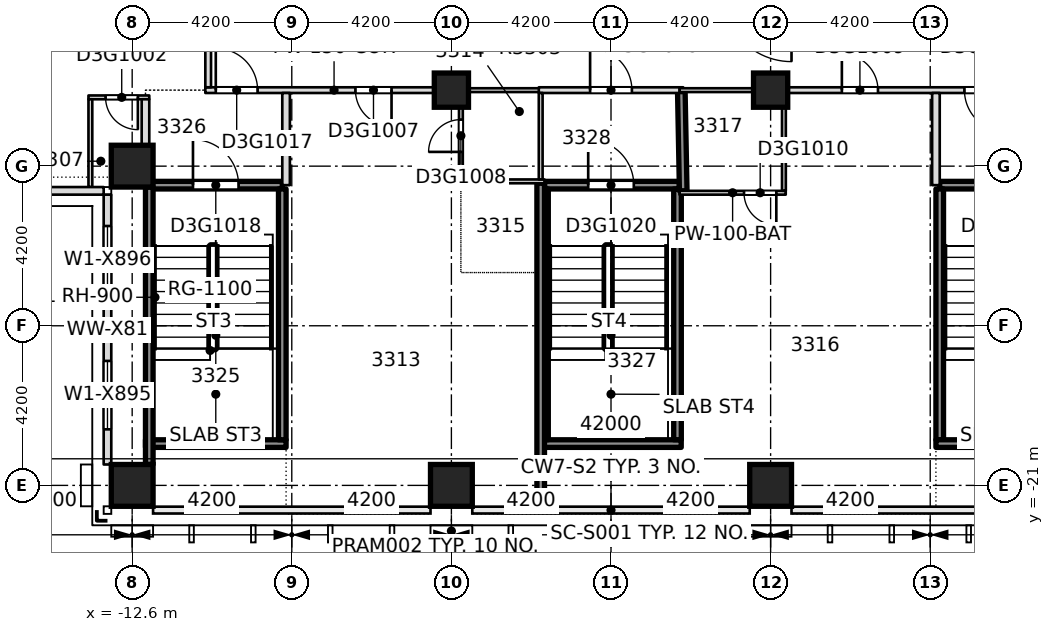
"""IFC4 building model, lengths in metres.
Left out: names, types, materials, properties, quantities, classifications, styles, units other than length and angle.
Written with IfcOpenShell. Run it as: python <this file> out.ifc"""

import sys

from ifc_helpers import new_model, si_unit, direction, frame, frame_2d, origin, origin_2d, place, context, subcontext, project, spatial, rectangle, extrude, element, fill, save


model = new_model("IFC4")
c1 = context("Model", 3, precision=1e-05, world=origin(), true_north=direction((0.0, 1.0)))
c2 = subcontext(c1, "Body", "Model", "MODEL_VIEW")
j1 = project(units=[si_unit("LENGTHUNIT", "METRE"), si_unit("PLANEANGLEUNIT", "RADIAN")], contexts=[c1])
p1 = place(None, origin())
s1 = spatial("IfcSite", under=j1, at=p1, CompositionType="ELEMENT")
p2 = place(p1, origin())
s2 = spatial("IfcBuilding", under=s1, at=p2, CompositionType="ELEMENT")
p3 = place(p2, frame((0.0, 0.0, 133.1)))
s3 = spatial("IfcBuildingStorey", under=s2, at=p3, CompositionType="ELEMENT", Elevation=133.1)
for number, where, z_axis, x_axis in (
    (1, (-12.6, -21.0, -0.4), (0.0, 0.0, 1.0), (1.0, 0.0, 0.0)),
    (2, (-4.2, -21.0, -0.4), (0.0, 0.0, 1.0), (1.0, 0.0, 0.0)),
    (3, (4.2, -21.0, -0.4), (0.0, 0.0, 1.0), (1.0, 0.0, 0.0)),
    (4, (-12.6, -12.6, -0.4), (0.0, 0.0, 1.0), (1.0, 0.0, 0.0)),
):
    element("IfcColumn", number, at=place(p3, frame(where, z_axis=z_axis, x_axis=x_axis)), inside=s3, PredefinedType="COLUMN", context=c2, shape_type="SweptSolid", body=[
        extrude(rectangle(XDim=1.1, YDim=1.1, at=origin_2d()), origin(), (0.0, 0.0, 1.0), 3.45),
    ])
for number, where, z_axis, x_axis in (
    (5, (-4.2, -10.6, -0.4), (0.0, 0.0, 1.0), (1.0, 0.0, 0.0)),
    (6, (4.2, -10.6, -0.4), (0.0, 0.0, 1.0), (1.0, 0.0, 0.0)),
):
    element("IfcColumn", number, at=place(p3, frame(where, z_axis=z_axis, x_axis=x_axis)), inside=s3, PredefinedType="COLUMN", context=c2, shape_type="SweptSolid", body=[
        extrude(rectangle(XDim=0.9, YDim=0.9, at=origin_2d()), origin(), (0.0, 0.0, 1.0), 3.45),
    ])
p4 = place(p3, frame((-1.848, -19.9, 0.0), z_axis=(0.0, 0.0, 1.0), x_axis=(1.0, 0.0, 0.0)))
e7 = element("IfcWall", 7, at=p4, inside=s3, PredefinedType="SOLIDWALL", context=c2, shape_type="SweptSolid", body=[
    extrude(rectangle(XDim=3.696, YDim=0.2, at=frame_2d((1.848, 0.0))), origin(), (0.0, 0.0, 1.0), 3.05),
])
p5 = place(p3, frame((1.802, -13.3, 0.0), z_axis=(0.0, 0.0, 1.0), x_axis=(1.0, 0.0, 0.0)))
e8 = element("IfcWall", 8, at=p5, inside=s3, PredefinedType="PARTITIONING", context=c2, shape_type="SweptSolid", body=[
    extrude(rectangle(XDim=2.796, YDim=0.1, at=frame_2d((1.398, 0.0))), origin(), (0.0, 0.0, 1.0), 3.05),
])
p6 = place(p5, frame((1.698, 0.0, 0.0)))
e9 = element("IfcOpeningElement", 9, at=p6, cuts=e8, PredefinedType="OPENING", context=c2, shape_type="SweptSolid", body=[
    extrude(rectangle(XDim=0.85, YDim=2.1, at=frame_2d((0.425, 1.05))), frame((0.0, 0.06, 0.0), z_axis=(0.0, -1.0, 0.0), x_axis=(1.0, 0.0, 0.0)), (0.0, 0.0, 1.0), 0.12),
])
p7 = place(p3, frame((-12.15, -13.1, 0.0), z_axis=(0.0, 0.0, 1.0), x_axis=(1.0, 0.0, 0.0)))
e10 = element("IfcWall", 10, at=p7, inside=s3, PredefinedType="SOLIDWALL", context=c2, shape_type="SweptSolid", body=[
    extrude(rectangle(XDim=3.5, YDim=0.2, at=frame_2d((1.75, 0.0))), origin(), (0.0, 0.0, 1.0), 3.05),
])
p8 = place(p7, frame((1.15, 0.0, 0.0)))
e11 = element("IfcOpeningElement", 11, at=p8, cuts=e10, PredefinedType="OPENING", context=c2, shape_type="SweptSolid", body=[
    extrude(rectangle(XDim=1.2, YDim=2.1, at=frame_2d((0.6, 1.05))), frame((0.0, 0.11, 0.0), z_axis=(0.0, -1.0, 0.0), x_axis=(1.0, 0.0, 0.0)), (0.0, 0.0, 1.0), 0.22),
])
p9 = place(p3, frame((-1.748, -13.1, 0.0), z_axis=(0.0, 0.0, 1.0), x_axis=(1.0, 0.0, 0.0)))
e12 = element("IfcWall", 12, at=p9, inside=s3, PredefinedType="SOLIDWALL", context=c2, shape_type="SweptSolid", body=[
    extrude(rectangle(XDim=3.546, YDim=0.2, at=frame_2d((1.773, 0.0))), origin(), (0.0, 0.0, 1.0), 3.05),
])
p10 = place(p9, frame((1.148, 0.0, 0.0)))
e13 = element("IfcOpeningElement", 13, at=p10, cuts=e12, PredefinedType="OPENING", context=c2, shape_type="SweptSolid", body=[
    extrude(rectangle(XDim=1.2, YDim=2.1, at=frame_2d((0.6, 1.05))), frame((0.0, 0.11, 0.0), z_axis=(0.0, -1.0, 0.0), x_axis=(1.0, 0.0, 0.0)), (0.0, 0.0, 1.0), 0.22),
])
p11 = place(p3, frame((8.65, -13.1, 0.0), z_axis=(0.0, 0.0, 1.0), x_axis=(1.0, 0.0, 0.0)))
e14 = element("IfcWall", 14, at=p11, inside=s3, PredefinedType="SOLIDWALL", context=c2, shape_type="SweptSolid", body=[
    extrude(rectangle(XDim=3.5, YDim=0.2, at=frame_2d((1.75, 0.0))), origin(), (0.0, 0.0, 1.0), 3.05),
])
p12 = place(p11, frame((1.15, 0.0, 0.0)))
e15 = element("IfcOpeningElement", 15, at=p12, cuts=e14, PredefinedType="OPENING", context=c2, shape_type="SweptSolid", body=[
    extrude(rectangle(XDim=1.2, YDim=2.1, at=frame_2d((0.6, 1.05))), frame((0.0, 0.11, 0.0), z_axis=(0.0, -1.0, 0.0), x_axis=(1.0, 0.0, 0.0)), (0.0, 0.0, 1.0), 0.22),
])
p13 = place(p3, frame((-4.0, -13.0, 0.0), z_axis=(0.0, 0.0, 1.0), x_axis=(1.0, 0.0, 0.0)))
e16 = element("IfcWall", 16, at=p13, inside=s3, PredefinedType="PARTITIONING", context=c2, shape_type="SweptSolid", body=[
    extrude(rectangle(XDim=2.25, YDim=0.1, at=frame_2d((1.125, 0.0))), origin(), (0.0, 0.0, 1.0), 3.05),
])
p14 = place(p3, frame((-13.75, -10.79, 0.0), z_axis=(0.0, 0.0, 1.0), x_axis=(1.0, 0.0, 0.0)))
e17 = element("IfcWall", 17, at=p14, inside=s3, PredefinedType="PARTITIONING", context=c2, shape_type="SweptSolid", body=[
    extrude(rectangle(XDim=1.6, YDim=0.1, at=frame_2d((0.8, 0.0))), origin(), (0.0, 0.0, 1.0), 3.05),
])
p15 = place(p14, frame((0.45, 0.0, 0.0)))
e18 = element("IfcOpeningElement", 18, at=p15, cuts=e17, PredefinedType="OPENING", context=c2, shape_type="SweptSolid", body=[
    extrude(rectangle(XDim=0.85, YDim=2.1, at=frame_2d((0.425, 1.05))), frame((0.0, 0.06, 0.0), z_axis=(0.0, -1.0, 0.0), x_axis=(1.0, 0.0, 0.0)), (0.0, 0.0, 1.0), 0.12),
])
p16 = place(p3, frame((-10.675, -10.6, 0.0), z_axis=(0.0, 0.0, 1.0), x_axis=(1.0, 0.0, 0.0)))
e19 = element("IfcWall", 19, at=p16, inside=s3, PredefinedType="PARTITIONING", context=c2, shape_type="SweptSolid", body=[
    extrude(rectangle(XDim=6.775, YDim=0.15, at=frame_2d((3.388, 0.0))), origin(), (0.0, 0.0, 1.0), 3.05),
])
p17 = place(p16, frame((3.95, 0.0, 0.0)))
e20 = element("IfcOpeningElement", 20, at=p17, cuts=e19, PredefinedType="OPENING", context=c2, shape_type="SweptSolid", body=[
    extrude(rectangle(XDim=0.95, YDim=2.1, at=frame_2d((0.475, 1.05))), frame((0.0, 0.085, 0.0), z_axis=(0.0, -1.0, 0.0), x_axis=(1.0, 0.0, 0.0)), (0.0, 0.0, 1.0), 0.17),
])
p18 = place(p16, frame((0.275, 0.0, 0.0)))
e21 = element("IfcOpeningElement", 21, at=p18, cuts=e19, PredefinedType="OPENING", context=c2, shape_type="SweptSolid", body=[
    extrude(rectangle(XDim=1.1, YDim=2.1, at=frame_2d((0.55, 1.05))), frame((0.0, 0.085, 0.0), z_axis=(0.0, -1.0, 0.0), x_axis=(1.0, 0.0, 0.0)), (0.0, 0.0, 1.0), 0.17),
])
p19 = place(p3, frame((-4.0, -10.6, 0.0), z_axis=(0.0, 0.0, 1.0), x_axis=(1.0, 0.0, 0.0)))
e22 = element("IfcWall", 22, at=p19, inside=s3, PredefinedType="PARTITIONING", context=c2, shape_type="SweptSolid", body=[
    extrude(rectangle(XDim=2.2, YDim=0.1, at=frame_2d((1.1, 0.0))), origin(), (0.0, 0.0, 1.0), 3.05),
])
p20 = place(p3, frame((-1.9, -10.6, 0.0), z_axis=(0.0, 0.0, 1.0), x_axis=(1.0, 0.0, 0.0)))
e23 = element("IfcWall", 23, at=p20, inside=s3, PredefinedType="PARTITIONING", context=c2, shape_type="SweptSolid", body=[
    extrude(rectangle(XDim=3.8, YDim=0.15, at=frame_2d((1.9, 0.0))), origin(), (0.0, 0.0, 1.0), 3.05),
])
p21 = place(p20, frame((1.35, 0.0, 0.0)))
e24 = element("IfcOpeningElement", 24, at=p21, cuts=e23, PredefinedType="OPENING", context=c2, shape_type="SweptSolid", body=[
    extrude(rectangle(XDim=1.1, YDim=2.1, at=frame_2d((0.55, 1.05))), frame((0.0, 0.085, 0.0), z_axis=(0.0, -1.0, 0.0), x_axis=(1.0, 0.0, 0.0)), (0.0, 0.0, 1.0), 0.17),
])
p22 = place(p3, frame((1.8, -10.6, 0.0), z_axis=(0.0, 0.0, 1.0), x_axis=(1.0, 0.0, 0.0)))
e25 = element("IfcWall", 25, at=p22, inside=s3, PredefinedType="PARTITIONING", context=c2, shape_type="SweptSolid", body=[
    extrude(rectangle(XDim=2.8, YDim=0.1, at=frame_2d((1.4, 0.0))), origin(), (0.0, 0.0, 1.0), 3.05),
])
p23 = place(p3, frame((4.5, -10.6, 0.0), z_axis=(0.0, 0.0, 1.0), x_axis=(1.0, 0.0, 0.0)))
e26 = element("IfcWall", 26, at=p23, inside=s3, PredefinedType="PARTITIONING", context=c2, shape_type="SweptSolid", body=[
    extrude(rectangle(XDim=6.1, YDim=0.15, at=frame_2d((3.05, 0.0))), origin(), (0.0, 0.0, 1.0), 3.05),
])
p24 = place(p23, frame((1.575, 0.0, 0.0)))
e27 = element("IfcOpeningElement", 27, at=p24, cuts=e26, PredefinedType="OPENING", context=c2, shape_type="SweptSolid", body=[
    extrude(rectangle(XDim=0.95, YDim=2.1, at=frame_2d((0.475, 1.05))), frame((0.0, 0.085, 0.0), z_axis=(0.0, -1.0, 0.0), x_axis=(1.0, 0.0, 0.0)), (0.0, 0.0, 1.0), 0.17),
])
p25 = place(p23, frame((4.8, 0.0, 0.0)))
e28 = element("IfcOpeningElement", 28, at=p25, cuts=e26, PredefinedType="OPENING", context=c2, shape_type="SweptSolid", body=[
    extrude(rectangle(XDim=1.1, YDim=2.1, at=frame_2d((0.55, 1.05))), frame((0.0, 0.085, 0.0), z_axis=(0.0, -1.0, 0.0), x_axis=(1.0, 0.0, 0.0)), (0.0, 0.0, 1.0), 0.17),
])
p26 = place(p3, frame((-13.7, -13.15, 0.0), z_axis=(0.0, 0.0, 1.0), x_axis=(0.0, 1.0, 0.0)))
e29 = element("IfcWall", 29, at=p26, inside=s3, PredefinedType="PARTITIONING", context=c2, shape_type="SweptSolid", body=[
    extrude(rectangle(XDim=2.31, YDim=0.1, at=frame_2d((1.155, 0.0))), origin(), (0.0, 0.0, 1.0), 3.05),
])
p27 = place(p3, frame((-12.25, -12.89, 0.0), z_axis=(0.0, 0.0, 1.0), x_axis=(0.0, 1.0, 0.0)))
e30 = element("IfcWall", 30, at=p27, inside=s3, PredefinedType="PARTITIONING", context=c2, shape_type="SweptSolid", body=[
    extrude(rectangle(XDim=2.05, YDim=0.2, at=frame_2d((1.025, 0.0))), origin(), (0.0, 0.0, 1.0), 3.05),
])
p28 = place(p3, frame((-10.6, -10.525, 0.0), z_axis=(0.0, 0.0, 1.0), x_axis=(0.0, 1.0, 0.0)))
e31 = element("IfcWall", 31, at=p28, inside=s3, PredefinedType="PARTITIONING", context=c2, shape_type="SweptSolid", body=[
    extrude(rectangle(XDim=13.875, YDim=0.15, at=frame_2d((6.938, 0.0))), origin(), (0.0, 0.0, 1.0), 3.05),
])
p29 = place(p28, frame((2.325, 0.0, 0.0)))
e32 = element("IfcOpeningElement", 32, at=p29, cuts=e31, PredefinedType="OPENING", context=c2, shape_type="SweptSolid", body=[
    extrude(rectangle(XDim=0.95, YDim=2.1, at=frame_2d((0.475, 1.05))), frame((0.0, 0.085, 0.0), z_axis=(0.0, -1.0, 0.0), x_axis=(1.0, 0.0, 0.0)), (0.0, 0.0, 1.0), 0.17),
])
p30 = place(p28, frame((9.975, 0.0, 0.0)))
e33 = element("IfcOpeningElement", 33, at=p30, cuts=e31, PredefinedType="OPENING", context=c2, shape_type="SweptSolid", body=[
    extrude(rectangle(XDim=1.1, YDim=2.1, at=frame_2d((0.55, 1.05))), frame((0.0, 0.085, 0.0), z_axis=(0.0, -1.0, 0.0), x_axis=(1.0, 0.0, 0.0)), (0.0, 0.0, 1.0), 0.17),
])
p31 = place(p28, frame((4.825, 0.0, 0.0)))
e34 = element("IfcOpeningElement", 34, at=p31, cuts=e31, PredefinedType="OPENING", context=c2, shape_type="SweptSolid", body=[
    extrude(rectangle(XDim=1.0, YDim=2.1, at=frame_2d((0.5, 1.05))), frame((0.0, 0.085, 0.0), z_axis=(0.0, -1.0, 0.0), x_axis=(1.0, 0.0, 0.0)), (0.0, 0.0, 1.0), 0.17),
])
p32 = place(p28, frame((12.225, 0.0, 0.0)))
e35 = element("IfcOpeningElement", 35, at=p32, cuts=e31, PredefinedType="OPENING", context=c2, shape_type="SweptSolid", body=[
    extrude(rectangle(XDim=1.0, YDim=2.1, at=frame_2d((0.5, 1.05))), frame((0.0, 0.085, 0.0), z_axis=(0.0, -1.0, 0.0), x_axis=(1.0, 0.0, 0.0)), (0.0, 0.0, 1.0), 0.17),
])
p33 = place(p3, frame((-8.55, -13.1, 0.0), z_axis=(0.0, 0.0, 1.0), x_axis=(0.0, 1.0, 0.0)))
e36 = element("IfcWall", 36, at=p33, inside=s3, PredefinedType="PARTITIONING", context=c2, shape_type="SweptSolid", body=[
    extrude(rectangle(XDim=2.425, YDim=0.2, at=frame_2d((1.212, 0.0))), origin(), (0.0, 0.0, 1.0), 3.05),
])
p34 = place(p3, frame((-3.95, -12.95, 0.0), z_axis=(0.0, 0.0, 1.0), x_axis=(0.0, 1.0, 0.0)))
e37 = element("IfcWall", 37, at=p34, inside=s3, PredefinedType="PARTITIONING", context=c2, shape_type="SweptSolid", body=[
    extrude(rectangle(XDim=2.275, YDim=0.1, at=frame_2d((1.137, 0.0))), origin(), (0.0, 0.0, 1.0), 3.05),
])
p35 = place(p34, frame((0.725, 0.0, 0.0)))
e38 = element("IfcOpeningElement", 38, at=p35, cuts=e37, PredefinedType="OPENING", context=c2, shape_type="SweptSolid", body=[
    extrude(rectangle(XDim=0.85, YDim=2.1, at=frame_2d((0.425, 1.05))), frame((0.0, 0.06, 0.0), z_axis=(0.0, -1.0, 0.0), x_axis=(1.0, 0.0, 0.0)), (0.0, 0.0, 1.0), 0.12),
])
p36 = place(p3, frame((-1.85, -12.95, 0.0), z_axis=(0.0, 0.0, 1.0), x_axis=(0.0, 1.0, 0.0)))
e39 = element("IfcWall", 39, at=p36, inside=s3, PredefinedType="PARTITIONING", context=c2, shape_type="SweptSolid", body=[
    extrude(rectangle(XDim=2.275, YDim=0.1, at=frame_2d((1.137, 0.0))), origin(), (0.0, 0.0, 1.0), 3.05),
])
for number, where, z_axis, x_axis in (
    (40, (-1.75, -19.798, 0.0), (0.0, 0.0, 1.0), (0.0, 1.0, 0.0)),
    (41, (1.75, -19.798, 0.0), (0.0, 0.0, 1.0), (0.0, 1.0, 0.0)),
):
    element("IfcWall", number, at=place(p3, frame(where, z_axis=z_axis, x_axis=x_axis)), inside=s3, PredefinedType="SOLIDWALL", context=c2, shape_type="SweptSolid", body=[
        extrude(rectangle(XDim=6.596, YDim=0.2, at=frame_2d((3.298, 0.0))), origin(), (0.0, 0.0, 1.0), 3.05),
    ])
p37 = place(p3, frame((1.9, -13.248, 0.0), z_axis=(0.0, 0.0, 1.0), x_axis=(-0.019076944695, 0.999818018532, 0.0)))
e42 = element("IfcWall", 42, at=p37, inside=s3, PredefinedType="SOLIDWALL", context=c2, shape_type="SweptSolid", body=[
    extrude(rectangle(XDim=2.624, YDim=0.2, at=frame_2d((1.312, 0.0))), origin(), (0.0, 0.0, 1.0), 3.05),
])
p38 = place(p3, frame((4.55, -13.248, 0.0), z_axis=(0.0, 0.0, 1.0), x_axis=(0.0, 1.0, 0.0)))
e43 = element("IfcWall", 43, at=p38, inside=s3, PredefinedType="PARTITIONING", context=c2, shape_type="SweptSolid", body=[
    extrude(rectangle(XDim=2.573, YDim=0.1, at=frame_2d((1.287, 0.0))), origin(), (0.0, 0.0, 1.0), 3.05),
])
p39 = place(p3, frame((8.55, -13.1, 0.0), z_axis=(0.0, 0.0, 1.0), x_axis=(0.0, 1.0, 0.0)))
e44 = element("IfcWall", 44, at=p39, inside=s3, PredefinedType="PARTITIONING", context=c2, shape_type="SweptSolid", body=[
    extrude(rectangle(XDim=2.425, YDim=0.2, at=frame_2d((1.212, 0.0))), origin(), (0.0, 0.0, 1.0), 3.05),
])
p40 = place(p3, frame((-20.45, -13.25, 0.0), z_axis=(0.0, 0.0, 1.0), x_axis=(1.0, 0.0, 0.0)))
e45 = element("IfcWall", 45, at=p40, inside=s3, PredefinedType="STANDARD", context=c2, shape_type="SweptSolid", body=[
    extrude(rectangle(XDim=7.1, YDim=0.2, at=frame_2d((3.55, 0.0))), origin(), (0.0, 0.0, 1.0), 3.05),
])
p41 = place(p3, frame((-13.25, -13.35, 0.0), z_axis=(0.0, 0.0, 1.0), x_axis=(0.0, -1.0, 0.0)))
e46 = element("IfcWall", 46, at=p41, inside=s3, PredefinedType="STANDARD", context=c2, shape_type="SweptSolid", body=[
    extrude(rectangle(XDim=7.1, YDim=0.2, at=frame_2d((3.55, 0.0))), origin(), (0.0, 0.0, 1.0), 3.05),
])
p42 = place(p41, frame((4.375, 0.0, 0.2)))
e47 = element("IfcOpeningElement", 47, at=p42, cuts=e46, PredefinedType="OPENING", context=c2, shape_type="SweptSolid", body=[
    extrude(rectangle(XDim=1.8, YDim=2.65, at=frame_2d((0.9, 1.325))), frame((0.0, 0.11, 0.0), z_axis=(0.0, -1.0, 0.0), x_axis=(1.0, 0.0, 0.0)), (0.0, 0.0, 1.0), 0.22),
])
p43 = place(p41, frame((0.825, 0.0, 0.2)))
e48 = element("IfcOpeningElement", 48, at=p43, cuts=e46, PredefinedType="OPENING", context=c2, shape_type="SweptSolid", body=[
    extrude(rectangle(XDim=1.8, YDim=2.65, at=frame_2d((0.9, 1.325))), frame((0.0, 0.11, 0.0), z_axis=(0.0, -1.0, 0.0), x_axis=(1.0, 0.0, 0.0)), (0.0, 0.0, 1.0), 0.22),
])
p44 = place(p3, frame((-12.25, -19.9, 0.0), z_axis=(0.0, 0.0, 1.0), x_axis=(1.0, 0.0, 0.0)))
e49 = element("IfcWall", 49, at=p44, inside=s3, PredefinedType="SOLIDWALL", context=c2, shape_type="SweptSolid", body=[
    extrude(rectangle(XDim=3.7, YDim=0.2, at=frame_2d((1.85, 0.0))), origin(), (0.0, 0.0, 1.0), 3.05),
])
p45 = place(p3, frame((-12.15, -20.45, 0.0), z_axis=(0.0, 0.0, 1.0), x_axis=(0.0, 1.0, 0.0)))
e50 = element("IfcWall", 50, at=p45, inside=s3, PredefinedType="SOLIDWALL", context=c2, shape_type="SweptSolid", body=[
    extrude(rectangle(XDim=7.3, YDim=0.2, at=frame_2d((3.65, 0.0))), origin(), (0.0, 0.0, 1.0), 3.05),
])
for number, where, z_axis, x_axis in (
    (51, (-8.65, -19.8, 0.0), (0.0, 0.0, 1.0), (0.0, 1.0, 0.0)),
    (52, (8.65, -19.8, 0.0), (0.0, 0.0, 1.0), (0.0, 1.0, 0.0)),
):
    element("IfcWall", number, at=place(p3, frame(where, z_axis=z_axis, x_axis=x_axis)), inside=s3, PredefinedType="SOLIDWALL", context=c2, shape_type="SweptSolid", body=[
        extrude(rectangle(XDim=6.6, YDim=0.2, at=frame_2d((3.3, 0.0))), origin(), (0.0, 0.0, 1.0), 3.05),
    ])
p46 = place(p3, frame((-1.85, -21.55, 0.0), z_axis=(0.0, 0.0, 1.0), x_axis=(0.0, 1.0, 0.0)))
e53 = element("IfcWall", 53, at=p46, inside=s3, PredefinedType="SOLIDWALL", context=c2, shape_type="SweptSolid", body=[
    extrude(rectangle(XDim=8.5, YDim=0.2, at=frame_2d((4.25, 0.0))), origin(), (0.0, 0.0, 1.0), 3.05),
])
p47 = place(p3, frame((8.55, -19.9, 0.0), z_axis=(0.0, 0.0, 1.0), x_axis=(1.0, 0.0, 0.0)))
e54 = element("IfcWall", 54, at=p47, inside=s3, PredefinedType="SOLIDWALL", context=c2, shape_type="SweptSolid", body=[
    extrude(rectangle(XDim=3.7, YDim=0.2, at=frame_2d((1.85, 0.0))), origin(), (0.0, 0.0, 1.0), 3.05),
])
p48 = place(p15, origin())
e55 = element("IfcDoor", 55, at=p48, inside=s3, OperationType="SINGLE_SWING_RIGHT", PredefinedType="DOOR", context=c2, shape_type="SweptSolid", body=[
    extrude(rectangle(XDim=0.85, YDim=2.1, at=frame_2d((0.425, 1.05))), frame((0.0, 0.025, 0.0), z_axis=(0.0, -1.0, 0.0), x_axis=(1.0, 0.0, 0.0)), (0.0, 0.0, 1.0), 0.05),
])
fill(e18, e55)
p49 = place(p17, origin())
e56 = element("IfcDoor", 56, at=p49, inside=s3, OperationType="SINGLE_SWING_RIGHT", PredefinedType="DOOR", context=c2, shape_type="SweptSolid", body=[
    extrude(rectangle(XDim=0.95, YDim=2.1, at=frame_2d((0.475, 1.05))), frame((0.0, 0.025, 0.0), z_axis=(0.0, -1.0, 0.0), x_axis=(1.0, 0.0, 0.0)), (0.0, 0.0, 1.0), 0.05),
])
fill(e20, e56)
p50 = place(p35, origin())
e57 = element("IfcDoor", 57, at=p50, inside=s3, OperationType="SINGLE_SWING_RIGHT", PredefinedType="DOOR", context=c2, shape_type="SweptSolid", body=[
    extrude(rectangle(XDim=0.85, YDim=2.1, at=frame_2d((0.425, 1.05))), frame((0.0, 0.025, 0.0), z_axis=(0.0, -1.0, 0.0), x_axis=(1.0, 0.0, 0.0)), (0.0, 0.0, 1.0), 0.05),
])
fill(e38, e57)
p51 = place(p24, origin())
e58 = element("IfcDoor", 58, at=p51, inside=s3, OperationType="SINGLE_SWING_LEFT", PredefinedType="DOOR", context=c2, shape_type="SweptSolid", body=[
    extrude(rectangle(XDim=0.95, YDim=2.1, at=frame_2d((0.475, 1.05))), frame((0.0, 0.025, 0.0), z_axis=(0.0, -1.0, 0.0), x_axis=(1.0, 0.0, 0.0)), (0.0, 0.0, 1.0), 0.05),
])
fill(e27, e58)
p52 = place(p6, origin())
e59 = element("IfcDoor", 59, at=p52, inside=s3, OperationType="SINGLE_SWING_RIGHT", PredefinedType="DOOR", context=c2, shape_type="SweptSolid", body=[
    extrude(rectangle(XDim=0.85, YDim=2.1, at=frame_2d((0.425, 1.05))), frame((0.0, 0.025, 0.0), z_axis=(0.0, -1.0, 0.0), x_axis=(1.0, 0.0, 0.0)), (0.0, 0.0, 1.0), 0.05),
])
fill(e9, e59)
p53 = place(p18, origin())
e60 = element("IfcDoor", 60, at=p53, inside=s3, OperationType="SINGLE_SWING_RIGHT", PredefinedType="DOOR", context=c2, shape_type="SweptSolid", body=[
    extrude(rectangle(XDim=1.1, YDim=2.1, at=frame_2d((0.55, 1.05))), frame((0.0, 0.025, 0.0), z_axis=(0.0, -1.0, 0.0), x_axis=(1.0, 0.0, 0.0)), (0.0, 0.0, 1.0), 0.05),
])
fill(e21, e60)
p54 = place(p8, origin())
e61 = element("IfcDoor", 61, at=p54, inside=s3, OperationType="SINGLE_SWING_RIGHT", PredefinedType="DOOR", context=c2, shape_type="SweptSolid", body=[
    extrude(rectangle(XDim=1.2, YDim=2.1, at=frame_2d((0.6, 1.05))), frame((0.0, 0.025, 0.0), z_axis=(0.0, -1.0, 0.0), x_axis=(1.0, 0.0, 0.0)), (0.0, 0.0, 1.0), 0.05),
])
fill(e11, e61)
p55 = place(p21, origin())
e62 = element("IfcDoor", 62, at=p55, inside=s3, OperationType="SINGLE_SWING_RIGHT", PredefinedType="DOOR", context=c2, shape_type="SweptSolid", body=[
    extrude(rectangle(XDim=1.1, YDim=2.1, at=frame_2d((0.55, 1.05))), frame((0.0, 0.025, 0.0), z_axis=(0.0, -1.0, 0.0), x_axis=(1.0, 0.0, 0.0)), (0.0, 0.0, 1.0), 0.05),
])
fill(e24, e62)
p56 = place(p10, origin())
e63 = element("IfcDoor", 63, at=p56, inside=s3, OperationType="SINGLE_SWING_RIGHT", PredefinedType="DOOR", context=c2, shape_type="SweptSolid", body=[
    extrude(rectangle(XDim=1.2, YDim=2.1, at=frame_2d((0.6, 1.05))), frame((0.0, 0.025, 0.0), z_axis=(0.0, -1.0, 0.0), x_axis=(1.0, 0.0, 0.0)), (0.0, 0.0, 1.0), 0.05),
])
fill(e13, e63)
p57 = place(p25, origin())
e64 = element("IfcDoor", 64, at=p57, inside=s3, OperationType="SINGLE_SWING_RIGHT", PredefinedType="DOOR", context=c2, shape_type="SweptSolid", body=[
    extrude(rectangle(XDim=1.1, YDim=2.1, at=frame_2d((0.55, 1.05))), frame((0.0, 0.025, 0.0), z_axis=(0.0, -1.0, 0.0), x_axis=(1.0, 0.0, 0.0)), (0.0, 0.0, 1.0), 0.05),
])
fill(e28, e64)
p58 = place(p42, origin())
e65 = element("IfcWindow", 65, at=p58, inside=s3, PartitioningType="SINGLE_PANEL", PredefinedType="WINDOW", context=c2, shape_type="SweptSolid", body=[
    extrude(rectangle(XDim=1.8, YDim=2.65, at=frame_2d((0.9, 1.325))), frame((0.0, 0.03, 0.0), z_axis=(0.0, -1.0, 0.0), x_axis=(1.0, 0.0, 0.0)), (0.0, 0.0, 1.0), 0.06),
])
fill(e47, e65)
p59 = place(p43, origin())
e66 = element("IfcWindow", 66, at=p59, inside=s3, PartitioningType="SINGLE_PANEL", PredefinedType="WINDOW", context=c2, shape_type="SweptSolid", body=[
    extrude(rectangle(XDim=1.8, YDim=2.65, at=frame_2d((0.9, 1.325))), frame((0.0, 0.03, 0.0), z_axis=(0.0, -1.0, 0.0), x_axis=(1.0, 0.0, 0.0)), (0.0, 0.0, 1.0), 0.06),
])
fill(e48, e66)
save(model, sys.argv[1])
